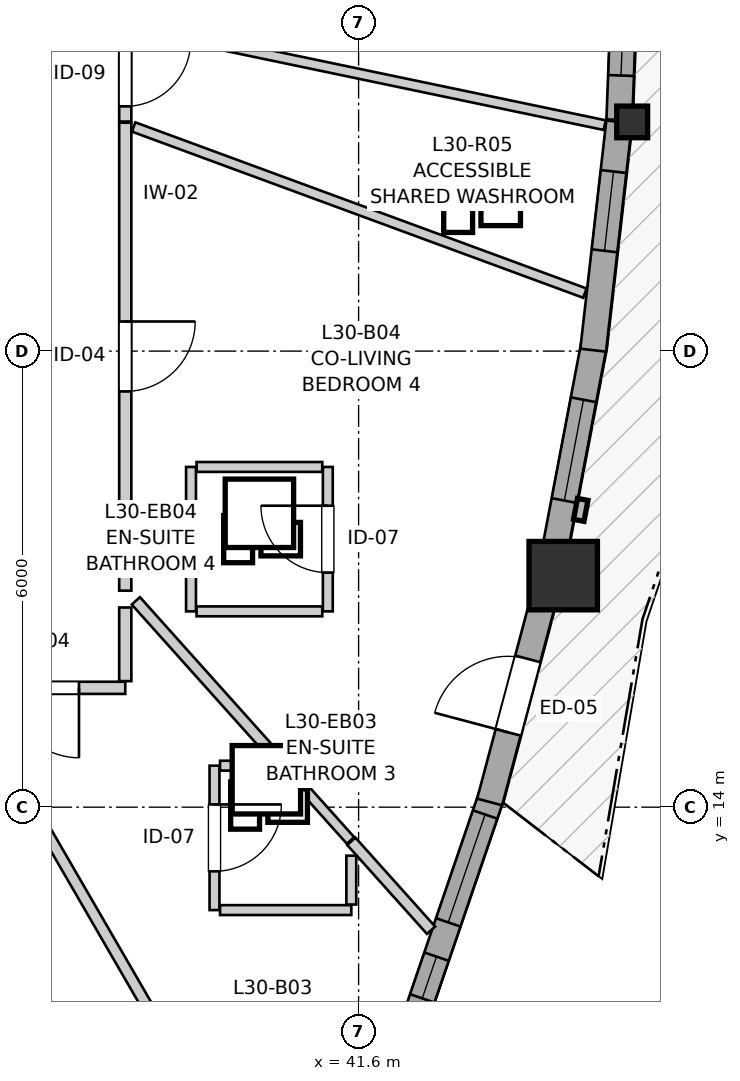
"""IFC4 building model, lengths in metres.
Left out: names, types, materials, properties, quantities, classifications, styles, units other than length and angle.
Written with IfcOpenShell. Run it as: python <this file> out.ifc"""

import sys

from ifc_helpers import new_model, si_unit, direction, frame, frame_2d, origin, origin_2d, place, context, subcontext, project, spatial, rectangle, i_section, extrude, source, transform, mapped, element, fill, save


model = new_model("IFC4")
c1 = context("Model", 3, precision=1e-05, world=origin(), true_north=direction((0.0, 1.0)))
c2 = subcontext(c1, "Body", "Model", "MODEL_VIEW")
j1 = project(units=[si_unit("LENGTHUNIT", "METRE"), si_unit("PLANEANGLEUNIT", "RADIAN")], contexts=[c1])
p1 = place(None, origin())
s1 = spatial("IfcSite", under=j1, at=p1, CompositionType="ELEMENT")
p2 = place(p1, origin())
s2 = spatial("IfcBuilding", under=s1, at=p2, CompositionType="ELEMENT")
p3 = place(p2, frame((0.0, 0.0, 102.4)))
s3 = spatial("IfcBuildingStorey", under=s2, at=p3, CompositionType="ELEMENT", Elevation=102.4)
m1 = source(origin(), c2, "Body", "SweptSolid", [
    extrude(rectangle(XDim=0.9, YDim=0.9, at=origin_2d()), origin(), (0.0, 0.0, 1.0), 2.95),
])
p4 = place(p3, frame((44.292, 17.046, 0.0), z_axis=(0.0, 0.0, 1.0), x_axis=(1.0, 0.0, 0.0)))
e1 = element("IfcColumn", 1, at=p4, inside=s3, PredefinedType="COLUMN", context=c2, shape_type="MappedRepresentation", body=[
    mapped(m1, transform((0.0, 0.0, 0.0), x_axis=(1.0, 0.0, 0.0), y_axis=(0.0, 1.0, 0.0), z_axis=(0.0, 0.0, 1.0), scale=1.0)),
])
m2 = source(origin(), c2, "Body", "SweptSolid", [
    extrude(i_section(OverallWidth=0.406, OverallDepth=0.416, WebThickness=0.027, FlangeThickness=0.044, FilletRadius=0.015, at=origin_2d()), origin(), (0.0, 0.0, 1.0), 2.95),
])
p5 = place(p3, frame((45.199, 23.015, 0.0), z_axis=(0.0, 0.0, 1.0), x_axis=(1.0, 0.0, 0.0)))
e2 = element("IfcColumn", 2, at=p5, inside=s3, PredefinedType="PILASTER", context=c2, shape_type="MappedRepresentation", body=[
    mapped(m2, transform((0.0, 0.0, 0.0), x_axis=(1.0, 0.0, 0.0), y_axis=(0.0, 1.0, 0.0), z_axis=(0.0, 0.0, 1.0), scale=1.0)),
])
p6 = place(p3, frame((42.323, 11.151, 0.0), z_axis=(0.0, 0.0, 1.0), x_axis=(0.323606092462, 0.94619189223, 0.0)))
e3 = element("IfcWall", 3, at=p6, inside=s3, PredefinedType="SOLIDWALL", context=c2, shape_type="SweptSolid", body=[
    extrude(rectangle(XDim=3.172, YDim=0.34, at=frame_2d((1.586, 0.0))), origin(), (0.0, 0.0, 1.0), 2.48),
])
p7 = place(p6, frame((0.353, 0.0, 0.82)))
e4 = element("IfcOpeningElement", 4, at=p7, cuts=e3, PredefinedType="OPENING", context=c2, shape_type="SweptSolid", body=[
    extrude(rectangle(XDim=0.58, YDim=1.35, at=frame_2d((0.29, 0.675))), frame((0.0, 0.18, 0.0), z_axis=(0.0, -1.0, 0.0), x_axis=(1.0, 0.0, 0.0)), (0.0, 0.0, 1.0), 0.36),
])
p8 = place(p6, frame((1.41, 0.0, 0.82)))
e5 = element("IfcOpeningElement", 5, at=p8, cuts=e3, PredefinedType="OPENING", context=c2, shape_type="SweptSolid", body=[
    extrude(rectangle(XDim=1.5, YDim=1.45, at=frame_2d((0.75, 0.725))), frame((0.0, 0.18, 0.0), z_axis=(0.0, -1.0, 0.0), x_axis=(1.0, 0.0, 0.0)), (0.0, 0.0, 1.0), 0.36),
])
p9 = place(p3, frame((43.324, 14.068, 0.0), z_axis=(0.0, 0.0, 1.0), x_axis=(0.257085513118, 0.966388658328, 0.0)))
e6 = element("IfcWall", 6, at=p9, inside=s3, PredefinedType="SOLIDWALL", context=c2, shape_type="SweptSolid", body=[
    extrude(rectangle(XDim=2.896, YDim=0.34, at=frame_2d((1.448, 0.0))), origin(), (0.0, 0.0, 1.0), 2.48),
])
p10 = place(p9, frame((0.948, 0.0, 0.0)))
e7 = element("IfcOpeningElement", 7, at=p10, cuts=e6, PredefinedType="OPENING", context=c2, shape_type="SweptSolid", body=[
    extrude(rectangle(XDim=1.0, YDim=2.1, at=frame_2d((0.5, 1.05))), frame((0.0, 0.18, 0.0), z_axis=(0.0, -1.0, 0.0), x_axis=(1.0, 0.0, 0.0)), (0.0, 0.0, 1.0), 0.36),
])
p11 = place(p3, frame((44.168, 17.304, 0.0), z_axis=(0.0, 0.0, 1.0), x_axis=(0.186654850509, 0.982425552793, 0.0)))
e8 = element("IfcWall", 8, at=p11, inside=s3, PredefinedType="SOLIDWALL", context=c2, shape_type="SweptSolid", body=[
    extrude(rectangle(XDim=2.846, YDim=0.34, at=frame_2d((1.423, 0.0))), origin(), (0.0, 0.0, 1.0), 2.48),
])
p12 = place(p11, frame((0.743, 0.0, 0.82)))
e9 = element("IfcOpeningElement", 9, at=p12, cuts=e8, PredefinedType="OPENING", context=c2, shape_type="SweptSolid", body=[
    extrude(rectangle(XDim=1.35, YDim=1.45, at=frame_2d((0.675, 0.725))), frame((0.0, 0.18, 0.0), z_axis=(0.0, -1.0, 0.0), x_axis=(1.0, 0.0, 0.0)), (0.0, 0.0, 1.0), 0.36),
])
p13 = place(p3, frame((44.686, 20.012, 0.0), z_axis=(0.0, 0.0, 1.0), x_axis=(0.113268604106, 0.993564403209, 0.0)))
e10 = element("IfcWall", 10, at=p13, inside=s3, PredefinedType="SOLIDWALL", context=c2, shape_type="SweptSolid", body=[
    extrude(rectangle(XDim=3.022, YDim=0.34, at=frame_2d((1.511, 0.0))), origin(), (0.0, 0.0, 1.0), 2.48),
])
p14 = place(p13, frame((1.316, 0.0, 0.82)))
e11 = element("IfcOpeningElement", 11, at=p14, cuts=e10, PredefinedType="OPENING", context=c2, shape_type="SweptSolid", body=[
    extrude(rectangle(XDim=1.05, YDim=1.45, at=frame_2d((0.525, 0.725))), frame((0.0, 0.18, 0.0), z_axis=(0.0, -1.0, 0.0), x_axis=(1.0, 0.0, 0.0)), (0.0, 0.0, 1.0), 0.36),
])
p15 = place(p3, frame((45.031, 23.042, 0.0), z_axis=(0.0, 0.0, 1.0), x_axis=(0.037943223979, 0.999279896603, 0.0)))
e12 = element("IfcWall", 12, at=p15, inside=s3, PredefinedType="SOLIDWALL", context=c2, shape_type="SweptSolid", body=[
    extrude(rectangle(XDim=3.005, YDim=0.34, at=frame_2d((1.502, 0.0))), origin(), (0.0, 0.0, 1.0), 2.48),
])
p16 = place(p15, frame((0.584, 0.0, 0.82)))
e13 = element("IfcOpeningElement", 13, at=p16, cuts=e12, PredefinedType="OPENING", context=c2, shape_type="SweptSolid", body=[
    extrude(rectangle(XDim=1.05, YDim=1.45, at=frame_2d((0.525, 0.725))), frame((0.0, 0.18, 0.0), z_axis=(0.0, -1.0, 0.0), x_axis=(1.0, 0.0, 0.0)), (0.0, 0.0, 1.0), 0.36),
])
p17 = place(p3, frame((38.53, 23.005, 0.0), z_axis=(0.0, 0.0, 1.0), x_axis=(0.0, -1.0, 0.0)))
e14 = element("IfcWall", 14, at=p17, inside=s3, PredefinedType="PARTITIONING", context=c2, shape_type="SweptSolid", body=[
    extrude(rectangle(XDim=6.157, YDim=0.16, at=frame_2d((3.079, 0.0))), origin(), (0.0, 0.0, 1.0), 2.95),
])
p18 = place(p17, frame((2.615, 0.0, 0.0)))
e15 = element("IfcOpeningElement", 15, at=p18, cuts=e14, PredefinedType="OPENING", context=c2, shape_type="SweptSolid", body=[
    extrude(rectangle(XDim=0.92, YDim=2.1, at=frame_2d((0.46, 1.05))), frame((0.0, 0.09, 0.0), z_axis=(0.0, -1.0, 0.0), x_axis=(1.0, 0.0, 0.0)), (0.0, 0.0, 1.0), 0.18),
])
p19 = place(p3, frame((38.53, 15.57, 0.0), z_axis=(0.0, 0.0, 1.0), x_axis=(-1.0, 0.0, 0.0)))
e16 = element("IfcWall", 16, at=p19, inside=s3, PredefinedType="PARTITIONING", context=c2, shape_type="SweptSolid", body=[
    extrude(rectangle(XDim=2.156, YDim=0.16, at=frame_2d((1.078, 0.0))), origin(), (0.0, 0.0, 1.0), 2.95),
])
p20 = place(p19, frame((0.609, 0.0, 0.0)))
e17 = element("IfcOpeningElement", 17, at=p20, cuts=e16, PredefinedType="OPENING", context=c2, shape_type="SweptSolid", body=[
    extrude(rectangle(XDim=0.92, YDim=2.1, at=frame_2d((0.46, 1.05))), frame((0.0, 0.09, 0.0), z_axis=(0.0, -1.0, 0.0), x_axis=(1.0, 0.0, 0.0)), (0.0, 0.0, 1.0), 0.18),
])
p21 = place(p3, frame((39.704, 14.546, 0.0), z_axis=(0.0, 0.0, 1.0), x_axis=(0.0, -1.0, 0.0)))
e18 = element("IfcWall", 18, at=p21, inside=s3, PredefinedType="PARTITIONING", context=c2, shape_type="SweptSolid", body=[
    extrude(rectangle(XDim=1.9, YDim=0.13, at=frame_2d((0.95, 0.0))), origin(), (0.0, 0.0, 1.0), 2.95),
])
p22 = place(p21, frame((0.51, 0.0, 0.0)))
e19 = element("IfcOpeningElement", 19, at=p22, cuts=e18, PredefinedType="OPENING", context=c2, shape_type="SweptSolid", body=[
    extrude(rectangle(XDim=0.88, YDim=2.05, at=frame_2d((0.44, 1.025))), frame((0.0, 0.075, 0.0), z_axis=(0.0, -1.0, 0.0), x_axis=(1.0, 0.0, 0.0)), (0.0, 0.0, 1.0), 0.15),
])
p23 = place(p3, frame((41.195, 16.576, 0.0), z_axis=(0.0, 0.0, 1.0), x_axis=(0.0, 1.0, 0.0)))
e20 = element("IfcWall", 20, at=p23, inside=s3, PredefinedType="PARTITIONING", context=c2, shape_type="SweptSolid", body=[
    extrude(rectangle(XDim=1.9, YDim=0.13, at=frame_2d((0.95, 0.0))), origin(), (0.0, 0.0, 1.0), 2.95),
])
p24 = place(p23, frame((0.51, 0.0, 0.0)))
e21 = element("IfcOpeningElement", 21, at=p24, cuts=e20, PredefinedType="OPENING", context=c2, shape_type="SweptSolid", body=[
    extrude(rectangle(XDim=0.88, YDim=2.05, at=frame_2d((0.44, 1.025))), frame((0.0, 0.075, 0.0), z_axis=(0.0, -1.0, 0.0), x_axis=(1.0, 0.0, 0.0)), (0.0, 0.0, 1.0), 0.15),
])
p25 = place(p3, frame((38.53, 24.306, 0.0), z_axis=(0.0, 0.0, 1.0), x_axis=(0.0, -1.0, 0.0)))
e22 = element("IfcWall", 22, at=p25, inside=s3, PredefinedType="PARTITIONING", context=c2, shape_type="SweptSolid", body=[
    extrude(rectangle(XDim=1.286, YDim=0.16, at=frame_2d((0.643, 0.0))), origin(), (0.0, 0.0, 1.0), 2.95),
])
p26 = place(p25, frame((0.226, 0.0, 0.0)))
e23 = element("IfcOpeningElement", 23, at=p26, cuts=e22, PredefinedType="OPENING", context=c2, shape_type="SweptSolid", body=[
    extrude(rectangle(XDim=0.86, YDim=2.05, at=frame_2d((0.43, 1.025))), frame((0.0, 0.09, 0.0), z_axis=(0.0, -1.0, 0.0), x_axis=(1.0, 0.0, 0.0)), (0.0, 0.0, 1.0), 0.18),
])
p27 = place(p3, frame((34.4, 15.457, 0.0), z_axis=(0.0, 0.0, 1.0), x_axis=(0.358586620169, -0.933496457324, 0.0)))
e24 = element("IfcWall", 24, at=p27, inside=s3, PredefinedType="PARTITIONING", context=c2, shape_type="SweptSolid", body=[
    extrude(rectangle(XDim=10.256, YDim=0.145, at=frame_2d((5.128, 0.0))), origin(), (0.0, 0.0, 1.0), 2.95),
])
p28 = place(p3, frame((36.463, 15.447, 0.0), z_axis=(0.0, 0.0, 1.0), x_axis=(0.501201369888, -0.86533068062, 0.0)))
e25 = element("IfcWall", 25, at=p28, inside=s3, PredefinedType="PARTITIONING", context=c2, shape_type="SweptSolid", body=[
    extrude(rectangle(XDim=8.918, YDim=0.145, at=frame_2d((4.459, 0.0))), origin(), (0.0, 0.0, 1.0), 2.95),
])
p29 = place(p3, frame((38.64, 22.948, 0.0), z_axis=(0.0, 0.0, 1.0), x_axis=(0.938426101424, -0.3454800315, 0.0)))
e26 = element("IfcWall", 26, at=p29, inside=s3, PredefinedType="PARTITIONING", context=c2, shape_type="SweptSolid", body=[
    extrude(rectangle(XDim=6.327, YDim=0.13, at=frame_2d((3.164, 0.0))), origin(), (0.0, 0.0, 1.0), 2.95),
])
p30 = place(p3, frame((38.631, 24.27, 0.0), z_axis=(0.0, 0.0, 1.0), x_axis=(0.978856283814, -0.204549201019, 0.0)))
e27 = element("IfcWall", 27, at=p30, inside=s3, PredefinedType="PARTITIONING", context=c2, shape_type="SweptSolid", body=[
    extrude(rectangle(XDim=6.341, YDim=0.13, at=frame_2d((3.171, 0.0))), origin(), (0.0, 0.0, 1.0), 2.95),
])
p31 = place(p3, frame((38.669, 16.715, 0.0), z_axis=(0.0, 0.0, 1.0), x_axis=(0.667262858083, -0.744822313188, 0.0)))
e28 = element("IfcWall", 28, at=p31, inside=s3, PredefinedType="PARTITIONING", context=c2, shape_type="SweptSolid", body=[
    extrude(rectangle(XDim=2.912, YDim=0.145, at=frame_2d((1.456, 0.0))), origin(), (0.0, 0.0, 1.0), 2.95),
])
p32 = place(p3, frame((39.395, 16.576, 0.0), z_axis=(0.0, 0.0, 1.0), x_axis=(0.0, 1.0, 0.0)))
e29 = element("IfcWall", 29, at=p32, inside=s3, PredefinedType="PARTITIONING", context=c2, shape_type="SweptSolid", body=[
    extrude(rectangle(XDim=1.9, YDim=0.13, at=frame_2d((0.95, 0.0))), origin(), (0.0, 0.0, 1.0), 2.95),
])
p33 = place(p3, frame((39.777, 12.646, 0.0), z_axis=(0.0, 0.0, 1.0), x_axis=(1.0, 0.0, 0.0)))
e30 = element("IfcWall", 30, at=p33, inside=s3, PredefinedType="PARTITIONING", context=c2, shape_type="SweptSolid", body=[
    extrude(rectangle(XDim=1.727, YDim=0.13, at=frame_2d((0.863, 0.0))), origin(), (0.0, 0.0, 1.0), 2.95),
])
for number, where, z_axis, x_axis in (
    (31, (39.468, 18.476, 0.0), (0.0, 0.0, 1.0), (1.0, 0.0, 0.0)),
    (32, (39.468, 16.576, 0.0), (0.0, 0.0, 1.0), (1.0, 0.0, 0.0)),
):
    element("IfcWall", number, at=place(p3, frame(where, z_axis=z_axis, x_axis=x_axis)), inside=s3, PredefinedType="PARTITIONING", context=c2, shape_type="SweptSolid", body=[
        extrude(rectangle(XDim=1.654, YDim=0.13, at=frame_2d((0.827, 0.0))), origin(), (0.0, 0.0, 1.0), 2.95),
    ])
p34 = place(p3, frame((41.504, 13.551, 0.0), z_axis=(0.0, 0.0, 1.0), x_axis=(0.667530166935, -0.744582753112, 0.0)))
e33 = element("IfcWall", 33, at=p34, inside=s3, PredefinedType="PARTITIONING", context=c2, shape_type="SweptSolid", body=[
    extrude(rectangle(XDim=1.572, YDim=0.145, at=frame_2d((0.786, 0.0))), origin(), (0.0, 0.0, 1.0), 2.95),
])
p35 = place(p3, frame((40.622, 14.535, 0.0), z_axis=(0.0, 0.0, 1.0), x_axis=(0.667455683483, -0.744649521981, 0.0)))
e34 = element("IfcWall", 34, at=p35, inside=s3, PredefinedType="PARTITIONING", context=c2, shape_type="SweptSolid", body=[
    extrude(rectangle(XDim=1.306, YDim=0.13, at=frame_2d((0.653, 0.0))), origin(), (0.0, 0.0, 1.0), 2.95),
])
p36 = place(p3, frame((38.53, 15.658, 0.0), z_axis=(0.0, 0.0, 1.0), x_axis=(0.0, 1.0, 0.0)))
e35 = element("IfcWall", 35, at=p36, inside=s3, PredefinedType="PARTITIONING", context=c2, shape_type="SweptSolid", body=[
    extrude(rectangle(XDim=0.969, YDim=0.16, at=frame_2d((0.484, 0.0))), origin(), (0.0, 0.0, 1.0), 2.95),
])
p37 = place(p3, frame((39.777, 14.546, 0.0), z_axis=(0.0, 0.0, 1.0), x_axis=(1.0, 0.0, 0.0)))
e36 = element("IfcWall", 36, at=p37, inside=s3, PredefinedType="PARTITIONING", context=c2, shape_type="SweptSolid", body=[
    extrude(rectangle(XDim=0.671, YDim=0.13, at=frame_2d((0.336, 0.0))), origin(), (0.0, 0.0, 1.0), 2.95),
])
p38 = place(p3, frame((41.504, 12.719, 0.0), z_axis=(0.0, 0.0, 1.0), x_axis=(0.0, 1.0, 0.0)))
e37 = element("IfcWall", 37, at=p38, inside=s3, PredefinedType="PARTITIONING", context=c2, shape_type="SweptSolid", body=[
    extrude(rectangle(XDim=0.643, YDim=0.13, at=frame_2d((0.321, 0.0))), origin(), (0.0, 0.0, 1.0), 2.95),
])
m3 = source(origin(), c2, "Body", "SweptSolid", [
    extrude(rectangle(XDim=0.58, YDim=1.35, at=frame_2d((0.29, 0.675))), frame((0.0, 0.03, 0.0), z_axis=(0.0, -1.0, 0.0), x_axis=(1.0, 0.0, 0.0)), (0.0, 0.0, 1.0), 0.06),
])
p39 = place(p7, origin())
e38 = element("IfcWindow", 38, at=p39, inside=s3, PartitioningType="SINGLE_PANEL", PredefinedType="WINDOW", context=c2, shape_type="MappedRepresentation", body=[
    mapped(m3, transform((0.0, 0.0, 0.0), x_axis=(1.0, 0.0, 0.0), y_axis=(0.0, 1.0, 0.0), z_axis=(0.0, 0.0, 1.0), scale=1.0)),
])
fill(e4, e38)
m4 = source(origin(), c2, "Body", "SweptSolid", [
    extrude(rectangle(XDim=1.5, YDim=1.45, at=frame_2d((0.75, 0.725))), frame((0.0, 0.03, 0.0), z_axis=(0.0, -1.0, 0.0), x_axis=(1.0, 0.0, 0.0)), (0.0, 0.0, 1.0), 0.06),
])
p40 = place(p8, origin())
e39 = element("IfcWindow", 39, at=p40, inside=s3, PartitioningType="SINGLE_PANEL", PredefinedType="WINDOW", context=c2, shape_type="MappedRepresentation", body=[
    mapped(m4, transform((0.0, 0.0, 0.0), x_axis=(1.0, 0.0, 0.0), y_axis=(0.0, 1.0, 0.0), z_axis=(0.0, 0.0, 1.0), scale=1.0)),
])
fill(e5, e39)
m5 = source(origin(), c2, "Body", "SweptSolid", [
    extrude(rectangle(XDim=1.35, YDim=1.45, at=frame_2d((0.675, 0.725))), frame((0.0, 0.03, 0.0), z_axis=(0.0, -1.0, 0.0), x_axis=(1.0, 0.0, 0.0)), (0.0, 0.0, 1.0), 0.06),
])
p41 = place(p12, origin())
e40 = element("IfcWindow", 40, at=p41, inside=s3, PartitioningType="SINGLE_PANEL", PredefinedType="WINDOW", context=c2, shape_type="MappedRepresentation", body=[
    mapped(m5, transform((0.0, 0.0, 0.0), x_axis=(1.0, 0.0, 0.0), y_axis=(0.0, 1.0, 0.0), z_axis=(0.0, 0.0, 1.0), scale=1.0)),
])
fill(e9, e40)
m6 = source(origin(), c2, "Body", "SweptSolid", [
    extrude(rectangle(XDim=1.05, YDim=1.45, at=frame_2d((0.525, 0.725))), frame((0.0, 0.03, 0.0), z_axis=(0.0, -1.0, 0.0), x_axis=(1.0, 0.0, 0.0)), (0.0, 0.0, 1.0), 0.06),
])
p42 = place(p14, origin())
e41 = element("IfcWindow", 41, at=p42, inside=s3, PartitioningType="SINGLE_PANEL", PredefinedType="WINDOW", context=c2, shape_type="MappedRepresentation", body=[
    mapped(m6, transform((0.0, 0.0, 0.0), x_axis=(1.0, 0.0, 0.0), y_axis=(0.0, 1.0, 0.0), z_axis=(0.0, 0.0, 1.0), scale=1.0)),
])
fill(e11, e41)
p43 = place(p16, origin())
e42 = element("IfcWindow", 42, at=p43, inside=s3, PartitioningType="SINGLE_PANEL", PredefinedType="WINDOW", context=c2, shape_type="MappedRepresentation", body=[
    mapped(m6, transform((0.0, 0.0, 0.0), x_axis=(1.0, 0.0, 0.0), y_axis=(0.0, 1.0, 0.0), z_axis=(0.0, 0.0, 1.0), scale=1.0)),
])
fill(e13, e42)
m7 = source(origin(), c2, "Body", "SweptSolid", [
    extrude(rectangle(XDim=1.0, YDim=2.1, at=frame_2d((0.5, 1.05))), frame((0.0, 0.025, 0.0), z_axis=(0.0, -1.0, 0.0), x_axis=(1.0, 0.0, 0.0)), (0.0, 0.0, 1.0), 0.05),
])
p44 = place(p10, origin())
e43 = element("IfcDoor", 43, at=p44, inside=s3, OperationType="SINGLE_SWING_LEFT", PredefinedType="DOOR", context=c2, shape_type="MappedRepresentation", body=[
    mapped(m7, transform((0.0, 0.0, 0.0), x_axis=(1.0, 0.0, 0.0), y_axis=(0.0, 1.0, 0.0), z_axis=(0.0, 0.0, 1.0), scale=1.0)),
])
fill(e7, e43)
m8 = source(origin(), c2, "Body", "SweptSolid", [
    extrude(rectangle(XDim=0.92, YDim=2.1, at=frame_2d((0.46, 1.05))), frame((0.0, 0.025, 0.0), z_axis=(0.0, -1.0, 0.0), x_axis=(1.0, 0.0, 0.0)), (0.0, 0.0, 1.0), 0.05),
])
p45 = place(p18, origin())
e44 = element("IfcDoor", 44, at=p45, inside=s3, OperationType="SINGLE_SWING_LEFT", PredefinedType="DOOR", context=c2, shape_type="MappedRepresentation", body=[
    mapped(m8, transform((0.0, 0.0, 0.0), x_axis=(1.0, 0.0, 0.0), y_axis=(0.0, 1.0, 0.0), z_axis=(0.0, 0.0, 1.0), scale=1.0)),
])
fill(e15, e44)
p46 = place(p20, origin())
e45 = element("IfcDoor", 45, at=p46, inside=s3, OperationType="SINGLE_SWING_LEFT", PredefinedType="DOOR", context=c2, shape_type="MappedRepresentation", body=[
    mapped(m8, transform((0.0, 0.0, 0.0), x_axis=(1.0, 0.0, 0.0), y_axis=(0.0, 1.0, 0.0), z_axis=(0.0, 0.0, 1.0), scale=1.0)),
])
fill(e17, e45)
m9 = source(origin(), c2, "Body", "SweptSolid", [
    extrude(rectangle(XDim=0.88, YDim=2.05, at=frame_2d((0.44, 1.025))), frame((0.0, 0.025, 0.0), z_axis=(0.0, -1.0, 0.0), x_axis=(1.0, 0.0, 0.0)), (0.0, 0.0, 1.0), 0.05),
])
p47 = place(p22, origin())
e46 = element("IfcDoor", 46, at=p47, inside=s3, OperationType="SINGLE_SWING_LEFT", PredefinedType="DOOR", context=c2, shape_type="MappedRepresentation", body=[
    mapped(m9, transform((0.0, 0.0, 0.0), x_axis=(1.0, 0.0, 0.0), y_axis=(0.0, 1.0, 0.0), z_axis=(0.0, 0.0, 1.0), scale=1.0)),
])
fill(e19, e46)
p48 = place(p24, origin())
e47 = element("IfcDoor", 47, at=p48, inside=s3, OperationType="SINGLE_SWING_RIGHT", PredefinedType="DOOR", context=c2, shape_type="MappedRepresentation", body=[
    mapped(m9, transform((0.0, 0.0, 0.0), x_axis=(1.0, 0.0, 0.0), y_axis=(0.0, 1.0, 0.0), z_axis=(0.0, 0.0, 1.0), scale=1.0)),
])
fill(e21, e47)
m10 = source(origin(), c2, "Body", "SweptSolid", [
    extrude(rectangle(XDim=0.86, YDim=2.05, at=frame_2d((0.43, 1.025))), frame((0.0, 0.025, 0.0), z_axis=(0.0, -1.0, 0.0), x_axis=(1.0, 0.0, 0.0)), (0.0, 0.0, 1.0), 0.05),
])
p49 = place(p26, origin())
e48 = element("IfcDoor", 48, at=p49, inside=s3, OperationType="SINGLE_SWING_LEFT", PredefinedType="DOOR", context=c2, shape_type="MappedRepresentation", body=[
    mapped(m10, transform((0.0, 0.0, 0.0), x_axis=(1.0, 0.0, 0.0), y_axis=(0.0, 1.0, 0.0), z_axis=(0.0, 0.0, 1.0), scale=1.0)),
])
fill(e23, e48)
save(model, sys.argv[1])
